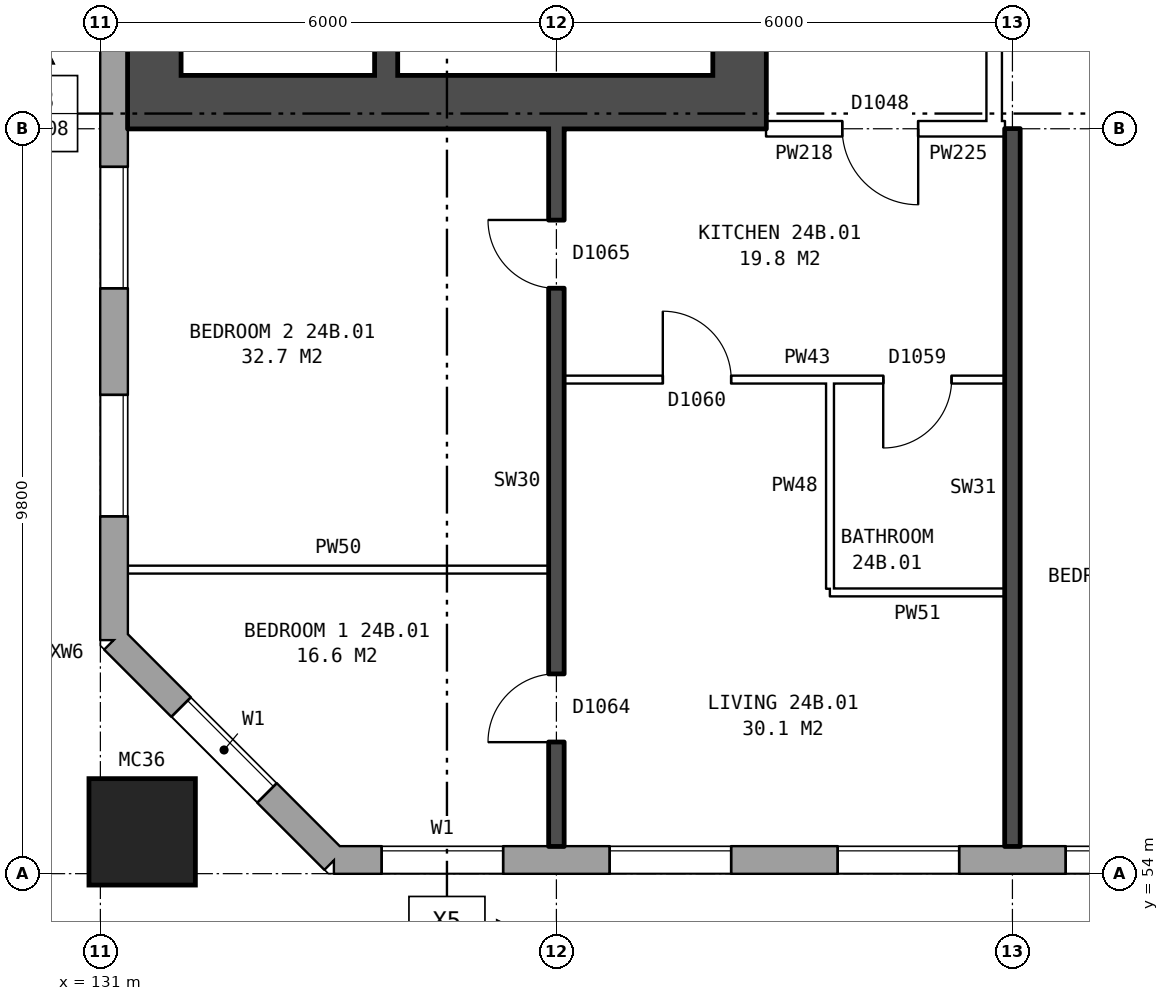
"""IFC4 building model, lengths in metres.
Left out: names, types, materials, properties, quantities, classifications, styles, units other than length and angle.
Written with IfcOpenShell. Run it as: python <this file> out.ifc"""

import sys

from ifc_helpers import new_model, si_unit, direction, frame, frame_2d, origin, origin_2d, place, context, subcontext, project, spatial, rectangle, hollow_rectangle, extrude, element, fill, save


model = new_model("IFC4")
c1 = context("Model", 3, precision=1e-05, world=origin(), true_north=direction((0.0, 1.0)))
c2 = subcontext(c1, "Body", "Model", "MODEL_VIEW")
j1 = project(units=[si_unit("LENGTHUNIT", "METRE"), si_unit("PLANEANGLEUNIT", "RADIAN")], contexts=[c1])
p1 = place(None, origin())
s1 = spatial("IfcSite", under=j1, at=p1, CompositionType="ELEMENT")
p2 = place(p1, origin())
s2 = spatial("IfcBuilding", under=s1, at=p2, CompositionType="ELEMENT")
p3 = place(p2, frame((0.0, 0.0, 87.1)))
s3 = spatial("IfcBuildingStorey", under=s2, at=p3, CompositionType="ELEMENT", Elevation=87.1)
p4 = place(p3, frame((131.55, 54.55, 0.0), z_axis=(0.0, 0.0, 1.0), x_axis=(1.0, 0.0, 0.0)))
e1 = element("IfcColumn", 1, at=p4, inside=s3, PredefinedType="COLUMN", context=c2, shape_type="SweptSolid", body=[
    extrude(hollow_rectangle(XDim=1.4, YDim=1.4, WallThickness=0.075, at=origin_2d()), origin(), (0.0, 0.0, 1.0), 3.1),
])
p5 = place(p3, frame((131.18, 57.075, 0.0), z_axis=(0.0, 0.0, 1.0), x_axis=(0.707106781187, -0.707106781187, 0.0)))
e2 = element("IfcWall", 2, at=p5, inside=s3, PredefinedType="STANDARD", context=c2, shape_type="SweptSolid", body=[
    extrude(rectangle(XDim=4.094, YDim=0.36, at=frame_2d((2.047, 0.0))), origin(), (0.0, 0.0, 1.0), 2.85),
])
p6 = place(p5, frame((1.247, 0.0, 0.8)))
e3 = element("IfcOpeningElement", 3, at=p6, cuts=e2, PredefinedType="OPENING", context=c2, shape_type="SweptSolid", body=[
    extrude(rectangle(XDim=1.6, YDim=1.8, at=frame_2d((0.8, 0.9))), frame((0.0, 0.19, 0.0), z_axis=(0.0, -1.0, 0.0), x_axis=(1.0, 0.0, 0.0)), (0.0, 0.0, 1.0), 0.38),
])
p7 = place(p3, frame((134.075, 54.18, 0.0), z_axis=(0.0, 0.0, 1.0), x_axis=(1.0, 0.0, 0.0)))
e4 = element("IfcWall", 4, at=p7, inside=s3, PredefinedType="STANDARD", context=c2, shape_type="SweptSolid", body=[
    extrude(rectangle(XDim=38.101, YDim=0.36, at=frame_2d((19.05, 0.0))), origin(), (0.0, 0.0, 1.0), 2.85),
])
p8 = place(p7, frame((0.625, 0.0, 0.8)))
e5 = element("IfcOpeningElement", 5, at=p8, cuts=e4, PredefinedType="OPENING", context=c2, shape_type="SweptSolid", body=[
    extrude(rectangle(XDim=1.6, YDim=1.8, at=frame_2d((0.8, 0.9))), frame((0.0, 0.19, 0.0), z_axis=(0.0, -1.0, 0.0), x_axis=(1.0, 0.0, 0.0)), (0.0, 0.0, 1.0), 0.38),
])
p9 = place(p7, frame((3.625, 0.0, 0.8)))
e6 = element("IfcOpeningElement", 6, at=p9, cuts=e4, PredefinedType="OPENING", context=c2, shape_type="SweptSolid", body=[
    extrude(rectangle(XDim=1.6, YDim=1.8, at=frame_2d((0.8, 0.9))), frame((0.0, 0.19, 0.0), z_axis=(0.0, -1.0, 0.0), x_axis=(1.0, 0.0, 0.0)), (0.0, 0.0, 1.0), 0.38),
])
p10 = place(p7, frame((6.625, 0.0, 0.8)))
e7 = element("IfcOpeningElement", 7, at=p10, cuts=e4, PredefinedType="OPENING", context=c2, shape_type="SweptSolid", body=[
    extrude(rectangle(XDim=1.6, YDim=1.8, at=frame_2d((0.8, 0.9))), frame((0.0, 0.19, 0.0), z_axis=(0.0, -1.0, 0.0), x_axis=(1.0, 0.0, 0.0)), (0.0, 0.0, 1.0), 0.38),
])
p11 = place(p7, frame((9.625, 0.0, 0.8)))
e8 = element("IfcOpeningElement", 8, at=p11, cuts=e4, PredefinedType="OPENING", context=c2, shape_type="SweptSolid", body=[
    extrude(rectangle(XDim=1.6, YDim=1.8, at=frame_2d((0.8, 0.9))), frame((0.0, 0.19, 0.0), z_axis=(0.0, -1.0, 0.0), x_axis=(1.0, 0.0, 0.0)), (0.0, 0.0, 1.0), 0.38),
])
p12 = place(p7, frame((12.625, 0.0, 0.8)))
e9 = element("IfcOpeningElement", 9, at=p12, cuts=e4, PredefinedType="OPENING", context=c2, shape_type="SweptSolid", body=[
    extrude(rectangle(XDim=1.6, YDim=1.8, at=frame_2d((0.8, 0.9))), frame((0.0, 0.19, 0.0), z_axis=(0.0, -1.0, 0.0), x_axis=(1.0, 0.0, 0.0)), (0.0, 0.0, 1.0), 0.38),
])
p13 = place(p7, frame((15.125, 0.0, 0.8)))
e10 = element("IfcOpeningElement", 10, at=p13, cuts=e4, PredefinedType="OPENING", context=c2, shape_type="SweptSolid", body=[
    extrude(rectangle(XDim=1.4, YDim=1.8, at=frame_2d((0.7, 0.9))), frame((0.0, 0.19, 0.0), z_axis=(0.0, -1.0, 0.0), x_axis=(1.0, 0.0, 0.0)), (0.0, 0.0, 1.0), 0.38),
])
p14 = place(p7, frame((18.325, 0.0, 0.15)))
e11 = element("IfcOpeningElement", 11, at=p14, cuts=e4, PredefinedType="OPENING", context=c2, shape_type="SweptSolid", body=[
    extrude(rectangle(XDim=1.4, YDim=1.2, at=frame_2d((0.7, 0.6))), frame((0.0, 0.19, 0.0), z_axis=(0.0, -1.0, 0.0), x_axis=(1.0, 0.0, 0.0)), (0.0, 0.0, 1.0), 0.38),
])
p15 = place(p7, frame((21.625, 0.0, 0.8)))
e12 = element("IfcOpeningElement", 12, at=p15, cuts=e4, PredefinedType="OPENING", context=c2, shape_type="SweptSolid", body=[
    extrude(rectangle(XDim=1.6, YDim=1.8, at=frame_2d((0.8, 0.9))), frame((0.0, 0.19, 0.0), z_axis=(0.0, -1.0, 0.0), x_axis=(1.0, 0.0, 0.0)), (0.0, 0.0, 1.0), 0.38),
])
p16 = place(p7, frame((24.625, 0.0, 0.8)))
e13 = element("IfcOpeningElement", 13, at=p16, cuts=e4, PredefinedType="OPENING", context=c2, shape_type="SweptSolid", body=[
    extrude(rectangle(XDim=1.6, YDim=1.8, at=frame_2d((0.8, 0.9))), frame((0.0, 0.19, 0.0), z_axis=(0.0, -1.0, 0.0), x_axis=(1.0, 0.0, 0.0)), (0.0, 0.0, 1.0), 0.38),
])
p17 = place(p7, frame((27.625, 0.0, 0.8)))
e14 = element("IfcOpeningElement", 14, at=p17, cuts=e4, PredefinedType="OPENING", context=c2, shape_type="SweptSolid", body=[
    extrude(rectangle(XDim=1.6, YDim=1.8, at=frame_2d((0.8, 0.9))), frame((0.0, 0.19, 0.0), z_axis=(0.0, -1.0, 0.0), x_axis=(1.0, 0.0, 0.0)), (0.0, 0.0, 1.0), 0.38),
])
p18 = place(p7, frame((30.625, 0.0, 0.8)))
e15 = element("IfcOpeningElement", 15, at=p18, cuts=e4, PredefinedType="OPENING", context=c2, shape_type="SweptSolid", body=[
    extrude(rectangle(XDim=1.6, YDim=1.8, at=frame_2d((0.8, 0.9))), frame((0.0, 0.19, 0.0), z_axis=(0.0, -1.0, 0.0), x_axis=(1.0, 0.0, 0.0)), (0.0, 0.0, 1.0), 0.38),
])
p19 = place(p7, frame((33.625, 0.0, 0.8)))
e16 = element("IfcOpeningElement", 16, at=p19, cuts=e4, PredefinedType="OPENING", context=c2, shape_type="SweptSolid", body=[
    extrude(rectangle(XDim=1.6, YDim=1.8, at=frame_2d((0.8, 0.9))), frame((0.0, 0.19, 0.0), z_axis=(0.0, -1.0, 0.0), x_axis=(1.0, 0.0, 0.0)), (0.0, 0.0, 1.0), 0.38),
])
p20 = place(p7, frame((16.825, 0.0, 1.7)))
e17 = element("IfcOpeningElement", 17, at=p20, cuts=e4, PredefinedType="OPENING", context=c2, shape_type="SweptSolid", body=[
    extrude(rectangle(XDim=0.6, YDim=0.9, at=frame_2d((0.3, 0.45))), frame((0.0, 0.19, 0.0), z_axis=(0.0, -1.0, 0.0), x_axis=(1.0, 0.0, 0.0)), (0.0, 0.0, 1.0), 0.38),
])
p21 = place(p3, frame((131.18, 82.925, 0.0), z_axis=(0.0, 0.0, 1.0), x_axis=(0.0, -1.0, 0.0)))
e18 = element("IfcWall", 18, at=p21, inside=s3, PredefinedType="STANDARD", context=c2, shape_type="SweptSolid", body=[
    extrude(rectangle(XDim=25.851, YDim=0.36, at=frame_2d((12.925, 0.0))), origin(), (0.0, 0.0, 1.0), 2.85),
])
p22 = place(p21, frame((1.625, 0.0, 0.8)))
e19 = element("IfcOpeningElement", 19, at=p22, cuts=e18, PredefinedType="OPENING", context=c2, shape_type="SweptSolid", body=[
    extrude(rectangle(XDim=1.6, YDim=1.8, at=frame_2d((0.8, 0.9))), frame((0.0, 0.19, 0.0), z_axis=(0.0, -1.0, 0.0), x_axis=(1.0, 0.0, 0.0)), (0.0, 0.0, 1.0), 0.38),
])
p23 = place(p21, frame((4.625, 0.0, 0.8)))
e20 = element("IfcOpeningElement", 20, at=p23, cuts=e18, PredefinedType="OPENING", context=c2, shape_type="SweptSolid", body=[
    extrude(rectangle(XDim=1.6, YDim=1.8, at=frame_2d((0.8, 0.9))), frame((0.0, 0.19, 0.0), z_axis=(0.0, -1.0, 0.0), x_axis=(1.0, 0.0, 0.0)), (0.0, 0.0, 1.0), 0.38),
])
p24 = place(p21, frame((19.625, 0.0, 0.8)))
e21 = element("IfcOpeningElement", 21, at=p24, cuts=e18, PredefinedType="OPENING", context=c2, shape_type="SweptSolid", body=[
    extrude(rectangle(XDim=1.6, YDim=1.8, at=frame_2d((0.8, 0.9))), frame((0.0, 0.19, 0.0), z_axis=(0.0, -1.0, 0.0), x_axis=(1.0, 0.0, 0.0)), (0.0, 0.0, 1.0), 0.38),
])
p25 = place(p21, frame((22.625, 0.0, 0.8)))
e22 = element("IfcOpeningElement", 22, at=p25, cuts=e18, PredefinedType="OPENING", context=c2, shape_type="SweptSolid", body=[
    extrude(rectangle(XDim=1.6, YDim=1.8, at=frame_2d((0.8, 0.9))), frame((0.0, 0.19, 0.0), z_axis=(0.0, -1.0, 0.0), x_axis=(1.0, 0.0, 0.0)), (0.0, 0.0, 1.0), 0.38),
])
p26 = place(p3, frame((139.41, 64.5, 0.0), z_axis=(0.0, 0.0, 1.0), x_axis=(0.0, 1.0, 0.0)))
e23 = element("IfcWall", 23, at=p26, inside=s3, PredefinedType="SHEAR", context=c2, shape_type="SweptSolid", body=[
    extrude(rectangle(XDim=11.0, YDim=0.7, at=frame_2d((5.5, 0.0))), origin(), (0.0, 0.0, 1.0), 2.85),
])
p27 = place(p26, frame((0.625, 0.0, 0.0)))
e24 = element("IfcOpeningElement", 24, at=p27, cuts=e23, PredefinedType="OPENING", context=c2, shape_type="SweptSolid", body=[
    extrude(rectangle(XDim=1.1, YDim=2.1, at=frame_2d((0.55, 1.05))), frame((0.0, 0.36, 0.0), z_axis=(0.0, -1.0, 0.0), x_axis=(1.0, 0.0, 0.0)), (0.0, 0.0, 1.0), 0.72),
])
p28 = place(p26, frame((9.2, 0.0, 0.0)))
e25 = element("IfcOpeningElement", 25, at=p28, cuts=e23, PredefinedType="OPENING", context=c2, shape_type="SweptSolid", body=[
    extrude(rectangle(XDim=1.1, YDim=2.1, at=frame_2d((0.55, 1.05))), frame((0.0, 0.36, 0.0), z_axis=(0.0, -1.0, 0.0), x_axis=(1.0, 0.0, 0.0)), (0.0, 0.0, 1.0), 0.72),
])
p29 = place(p26, frame((7.425, 0.0, 0.0)))
e26 = element("IfcOpeningElement", 26, at=p29, cuts=e23, PredefinedType="OPENING", context=c2, shape_type="SweptSolid", body=[
    extrude(rectangle(XDim=0.85, YDim=2.1, at=frame_2d((0.425, 1.05))), frame((0.0, 0.36, 0.0), z_axis=(0.0, -1.0, 0.0), x_axis=(1.0, 0.0, 0.0)), (0.0, 0.0, 1.0), 0.72),
])
p30 = place(p3, frame((131.71, 64.5, 0.0), z_axis=(0.0, 0.0, 1.0), x_axis=(0.0, 1.0, 0.0)))
e27 = element("IfcWall", 27, at=p30, inside=s3, PredefinedType="SHEAR", context=c2, shape_type="SweptSolid", body=[
    extrude(rectangle(XDim=11.0, YDim=0.7, at=frame_2d((5.5, 0.0))), origin(), (0.0, 0.0, 1.0), 2.85),
])
p31 = place(p3, frame((139.76, 64.15, 0.0), z_axis=(0.0, 0.0, 1.0), x_axis=(-1.0, 0.0, 0.0)))
e28 = element("IfcWall", 28, at=p31, inside=s3, PredefinedType="SHEAR", context=c2, shape_type="SweptSolid", body=[
    extrude(rectangle(XDim=8.4, YDim=0.7, at=frame_2d((4.2, 0.0))), origin(), (0.0, 0.0, 1.0), 2.85),
])
p32 = place(p3, frame((134.76, 64.5, 0.0), z_axis=(0.0, 0.0, 1.0), x_axis=(0.0, 1.0, 0.0)))
e29 = element("IfcWall", 29, at=p32, inside=s3, PredefinedType="SHEAR", context=c2, shape_type="SweptSolid", body=[
    extrude(rectangle(XDim=6.6, YDim=0.3, at=frame_2d((3.3, 0.0))), origin(), (0.0, 0.0, 1.0), 2.85),
])
p33 = place(p3, frame((142.76, 63.9, 0.0), z_axis=(0.0, 0.0, 1.0), x_axis=(0.0, 1.0, 0.0)))
e30 = element("IfcWall", 30, at=p33, inside=s3, PredefinedType="PARTITIONING", context=c2, shape_type="SweptSolid", body=[
    extrude(rectangle(XDim=12.2, YDim=0.2, at=frame_2d((6.1, 0.0))), origin(), (0.0, 0.0, 1.0), 2.85),
])
p34 = place(p33, frame((5.1, 0.0, 0.0)))
e31 = element("IfcOpeningElement", 31, at=p34, cuts=e30, PredefinedType="OPENING", context=c2, shape_type="SweptSolid", body=[
    extrude(rectangle(XDim=2.0, YDim=2.1, at=frame_2d((1.0, 1.05))), frame((0.0, 0.11, 0.0), z_axis=(0.0, -1.0, 0.0), x_axis=(1.0, 0.0, 0.0)), (0.0, 0.0, 1.0), 0.22),
])
p35 = place(p3, frame((140.6, 57.7, 0.0), z_axis=(0.0, 0.0, 1.0), x_axis=(1.0, 0.0, 0.0)))
e32 = element("IfcWall", 32, at=p35, inside=s3, PredefinedType="PARTITIONING", context=c2, shape_type="SweptSolid", body=[
    extrude(rectangle(XDim=2.3, YDim=0.1, at=frame_2d((1.15, 0.0))), origin(), (0.0, 0.0, 1.0), 2.85),
])
p36 = place(p3, frame((131.36, 58.0, 0.0), z_axis=(0.0, 0.0, 1.0), x_axis=(1.0, 0.0, 0.0)))
e33 = element("IfcWall", 33, at=p36, inside=s3, PredefinedType="PARTITIONING", context=c2, shape_type="SweptSolid", body=[
    extrude(rectangle(XDim=5.54, YDim=0.1, at=frame_2d((2.77, 0.0))), origin(), (0.0, 0.0, 1.0), 2.85),
])
p37 = place(p3, frame((137.1, 60.5, 0.0), z_axis=(0.0, 0.0, 1.0), x_axis=(1.0, 0.0, 0.0)))
e34 = element("IfcWall", 34, at=p37, inside=s3, PredefinedType="PARTITIONING", context=c2, shape_type="SweptSolid", body=[
    extrude(rectangle(XDim=5.8, YDim=0.1, at=frame_2d((2.9, 0.0))), origin(), (0.0, 0.0, 1.0), 2.85),
])
p38 = place(p37, frame((1.3, 0.0, 0.0)))
e35 = element("IfcOpeningElement", 35, at=p38, cuts=e34, PredefinedType="OPENING", context=c2, shape_type="SweptSolid", body=[
    extrude(rectangle(XDim=0.9, YDim=2.1, at=frame_2d((0.45, 1.05))), frame((0.0, 0.06, 0.0), z_axis=(0.0, -1.0, 0.0), x_axis=(1.0, 0.0, 0.0)), (0.0, 0.0, 1.0), 0.12),
])
p39 = place(p37, frame((4.2, 0.0, 0.0)))
e36 = element("IfcOpeningElement", 36, at=p39, cuts=e34, PredefinedType="OPENING", context=c2, shape_type="SweptSolid", body=[
    extrude(rectangle(XDim=0.9, YDim=2.1, at=frame_2d((0.45, 1.05))), frame((0.0, 0.06, 0.0), z_axis=(0.0, -1.0, 0.0), x_axis=(1.0, 0.0, 0.0)), (0.0, 0.0, 1.0), 0.12),
])
p40 = place(p3, frame((139.76, 63.8, 0.0), z_axis=(0.0, 0.0, 1.0), x_axis=(1.0, 0.0, 0.0)))
e37 = element("IfcWall", 37, at=p40, inside=s3, PredefinedType="PARTITIONING", context=c2, shape_type="SweptSolid", body=[
    extrude(rectangle(XDim=3.0, YDim=0.2, at=frame_2d((1.5, 0.0))), origin(), (0.0, 0.0, 1.0), 2.85),
])
p41 = place(p40, frame((1.0, 0.0, 0.0)))
e38 = element("IfcOpeningElement", 38, at=p41, cuts=e37, PredefinedType="OPENING", context=c2, shape_type="SweptSolid", body=[
    extrude(rectangle(XDim=1.0, YDim=2.1, at=frame_2d((0.5, 1.05))), frame((0.0, 0.11, 0.0), z_axis=(0.0, -1.0, 0.0), x_axis=(1.0, 0.0, 0.0)), (0.0, 0.0, 1.0), 0.22),
])
p42 = place(p3, frame((142.76, 63.8, 0.0), z_axis=(0.0, 0.0, 1.0), x_axis=(1.0, 0.0, 0.0)))
e39 = element("IfcWall", 39, at=p42, inside=s3, PredefinedType="PARTITIONING", context=c2, shape_type="SweptSolid", body=[
    extrude(rectangle(XDim=0.14, YDim=0.2, at=frame_2d((0.07, 0.0))), origin(), (0.0, 0.0, 1.0), 2.85),
])
p43 = place(p3, frame((137.0, 54.36, 0.0), z_axis=(0.0, 0.0, 1.0), x_axis=(0.0, 1.0, 0.0)))
e40 = element("IfcWall", 40, at=p43, inside=s3, PredefinedType="SOLIDWALL", context=c2, shape_type="SweptSolid", body=[
    extrude(rectangle(XDim=9.44, YDim=0.2, at=frame_2d((4.72, 0.0))), origin(), (0.0, 0.0, 1.0), 2.85),
])
p44 = place(p43, frame((1.37, 0.0, 0.0)))
e41 = element("IfcOpeningElement", 41, at=p44, cuts=e40, PredefinedType="OPENING", context=c2, shape_type="SweptSolid", body=[
    extrude(rectangle(XDim=0.9, YDim=2.1, at=frame_2d((0.45, 1.05))), frame((0.0, 0.11, 0.0), z_axis=(0.0, -1.0, 0.0), x_axis=(1.0, 0.0, 0.0)), (0.0, 0.0, 1.0), 0.22),
])
p45 = place(p43, frame((7.34, 0.0, 0.0)))
e42 = element("IfcOpeningElement", 42, at=p45, cuts=e40, PredefinedType="OPENING", context=c2, shape_type="SweptSolid", body=[
    extrude(rectangle(XDim=0.9, YDim=2.1, at=frame_2d((0.45, 1.05))), frame((0.0, 0.11, 0.0), z_axis=(0.0, -1.0, 0.0), x_axis=(1.0, 0.0, 0.0)), (0.0, 0.0, 1.0), 0.22),
])
p46 = place(p3, frame((140.6, 57.75, 0.0), z_axis=(0.0, 0.0, 1.0), x_axis=(0.0, 1.0, 0.0)))
e43 = element("IfcWall", 43, at=p46, inside=s3, PredefinedType="PARTITIONING", context=c2, shape_type="SweptSolid", body=[
    extrude(rectangle(XDim=2.7, YDim=0.1, at=frame_2d((1.35, 0.0))), origin(), (0.0, 0.0, 1.0), 2.85),
])
p47 = place(p3, frame((143.0, 54.36, 0.0), z_axis=(0.0, 0.0, 1.0), x_axis=(0.0, 1.0, 0.0)))
e44 = element("IfcWall", 44, at=p47, inside=s3, PredefinedType="SOLIDWALL", context=c2, shape_type="SweptSolid", body=[
    extrude(rectangle(XDim=9.44, YDim=0.2, at=frame_2d((4.72, 0.0))), origin(), (0.0, 0.0, 1.0), 2.85),
])
p48 = place(p6, origin())
e45 = element("IfcWindow", 45, at=p48, inside=s3, PartitioningType="SINGLE_PANEL", PredefinedType="WINDOW", context=c2, shape_type="SweptSolid", body=[
    extrude(rectangle(XDim=1.6, YDim=1.8, at=frame_2d((0.8, 0.9))), frame((0.0, 0.15, 0.0), z_axis=(0.0, -1.0, 0.0), x_axis=(1.0, 0.0, 0.0)), (0.0, 0.0, 1.0), 0.06),
])
fill(e3, e45)
p49 = place(p8, origin())
e46 = element("IfcWindow", 46, at=p49, inside=s3, PartitioningType="SINGLE_PANEL", PredefinedType="WINDOW", context=c2, shape_type="SweptSolid", body=[
    extrude(rectangle(XDim=1.6, YDim=1.8, at=frame_2d((0.8, 0.9))), frame((0.0, 0.15, 0.0), z_axis=(0.0, -1.0, 0.0), x_axis=(1.0, 0.0, 0.0)), (0.0, 0.0, 1.0), 0.06),
])
fill(e5, e46)
p50 = place(p9, origin())
e47 = element("IfcWindow", 47, at=p50, inside=s3, PartitioningType="SINGLE_PANEL", PredefinedType="WINDOW", context=c2, shape_type="SweptSolid", body=[
    extrude(rectangle(XDim=1.6, YDim=1.8, at=frame_2d((0.8, 0.9))), frame((0.0, 0.15, 0.0), z_axis=(0.0, -1.0, 0.0), x_axis=(1.0, 0.0, 0.0)), (0.0, 0.0, 1.0), 0.06),
])
fill(e6, e47)
p51 = place(p10, origin())
e48 = element("IfcWindow", 48, at=p51, inside=s3, PartitioningType="SINGLE_PANEL", PredefinedType="WINDOW", context=c2, shape_type="SweptSolid", body=[
    extrude(rectangle(XDim=1.6, YDim=1.8, at=frame_2d((0.8, 0.9))), frame((0.0, 0.15, 0.0), z_axis=(0.0, -1.0, 0.0), x_axis=(1.0, 0.0, 0.0)), (0.0, 0.0, 1.0), 0.06),
])
fill(e7, e48)
p52 = place(p11, origin())
e49 = element("IfcWindow", 49, at=p52, inside=s3, PartitioningType="SINGLE_PANEL", PredefinedType="WINDOW", context=c2, shape_type="SweptSolid", body=[
    extrude(rectangle(XDim=1.6, YDim=1.8, at=frame_2d((0.8, 0.9))), frame((0.0, 0.15, 0.0), z_axis=(0.0, -1.0, 0.0), x_axis=(1.0, 0.0, 0.0)), (0.0, 0.0, 1.0), 0.06),
])
fill(e8, e49)
p53 = place(p24, origin())
e50 = element("IfcWindow", 50, at=p53, inside=s3, PartitioningType="SINGLE_PANEL", PredefinedType="WINDOW", context=c2, shape_type="SweptSolid", body=[
    extrude(rectangle(XDim=1.6, YDim=1.8, at=frame_2d((0.8, 0.9))), frame((0.0, 0.15, 0.0), z_axis=(0.0, -1.0, 0.0), x_axis=(1.0, 0.0, 0.0)), (0.0, 0.0, 1.0), 0.06),
])
fill(e21, e50)
p54 = place(p25, origin())
e51 = element("IfcWindow", 51, at=p54, inside=s3, PartitioningType="SINGLE_PANEL", PredefinedType="WINDOW", context=c2, shape_type="SweptSolid", body=[
    extrude(rectangle(XDim=1.6, YDim=1.8, at=frame_2d((0.8, 0.9))), frame((0.0, 0.15, 0.0), z_axis=(0.0, -1.0, 0.0), x_axis=(1.0, 0.0, 0.0)), (0.0, 0.0, 1.0), 0.06),
])
fill(e22, e51)
p55 = place(p44, origin())
e52 = element("IfcDoor", 52, at=p55, inside=s3, OperationType="SINGLE_SWING_LEFT", PredefinedType="DOOR", context=c2, shape_type="SweptSolid", body=[
    extrude(rectangle(XDim=0.9, YDim=2.1, at=frame_2d((0.45, 1.05))), frame((0.0, 0.025, 0.0), z_axis=(0.0, -1.0, 0.0), x_axis=(1.0, 0.0, 0.0)), (0.0, 0.0, 1.0), 0.05),
])
fill(e41, e52)
p56 = place(p45, origin())
e53 = element("IfcDoor", 53, at=p56, inside=s3, OperationType="SINGLE_SWING_RIGHT", PredefinedType="DOOR", context=c2, shape_type="SweptSolid", body=[
    extrude(rectangle(XDim=0.9, YDim=2.1, at=frame_2d((0.45, 1.05))), frame((0.0, 0.025, 0.0), z_axis=(0.0, -1.0, 0.0), x_axis=(1.0, 0.0, 0.0)), (0.0, 0.0, 1.0), 0.05),
])
fill(e42, e53)
p57 = place(p41, frame((1.0, 0.0, 0.0), z_axis=(0.0, 0.0, 1.0), x_axis=(-1.0, 0.0, 0.0)))
e54 = element("IfcDoor", 54, at=p57, inside=s3, OperationType="SINGLE_SWING_LEFT", PredefinedType="DOOR", context=c2, shape_type="SweptSolid", body=[
    extrude(rectangle(XDim=1.0, YDim=2.1, at=frame_2d((0.5, 1.05))), frame((0.0, 0.025, 0.0), z_axis=(0.0, -1.0, 0.0), x_axis=(1.0, 0.0, 0.0)), (0.0, 0.0, 1.0), 0.05),
])
fill(e38, e54)
p58 = place(p38, origin())
e55 = element("IfcDoor", 55, at=p58, inside=s3, OperationType="SINGLE_SWING_LEFT", PredefinedType="DOOR", context=c2, shape_type="SweptSolid", body=[
    extrude(rectangle(XDim=0.9, YDim=2.1, at=frame_2d((0.45, 1.05))), frame((0.0, 0.025, 0.0), z_axis=(0.0, -1.0, 0.0), x_axis=(1.0, 0.0, 0.0)), (0.0, 0.0, 1.0), 0.05),
])
fill(e35, e55)
p59 = place(p39, frame((0.9, 0.0, 0.0), z_axis=(0.0, 0.0, 1.0), x_axis=(-1.0, 0.0, 0.0)))
e56 = element("IfcDoor", 56, at=p59, inside=s3, OperationType="SINGLE_SWING_RIGHT", PredefinedType="DOOR", context=c2, shape_type="SweptSolid", body=[
    extrude(rectangle(XDim=0.9, YDim=2.1, at=frame_2d((0.45, 1.05))), frame((0.0, 0.025, 0.0), z_axis=(0.0, -1.0, 0.0), x_axis=(1.0, 0.0, 0.0)), (0.0, 0.0, 1.0), 0.05),
])
fill(e36, e56)
save(model, sys.argv[1])
